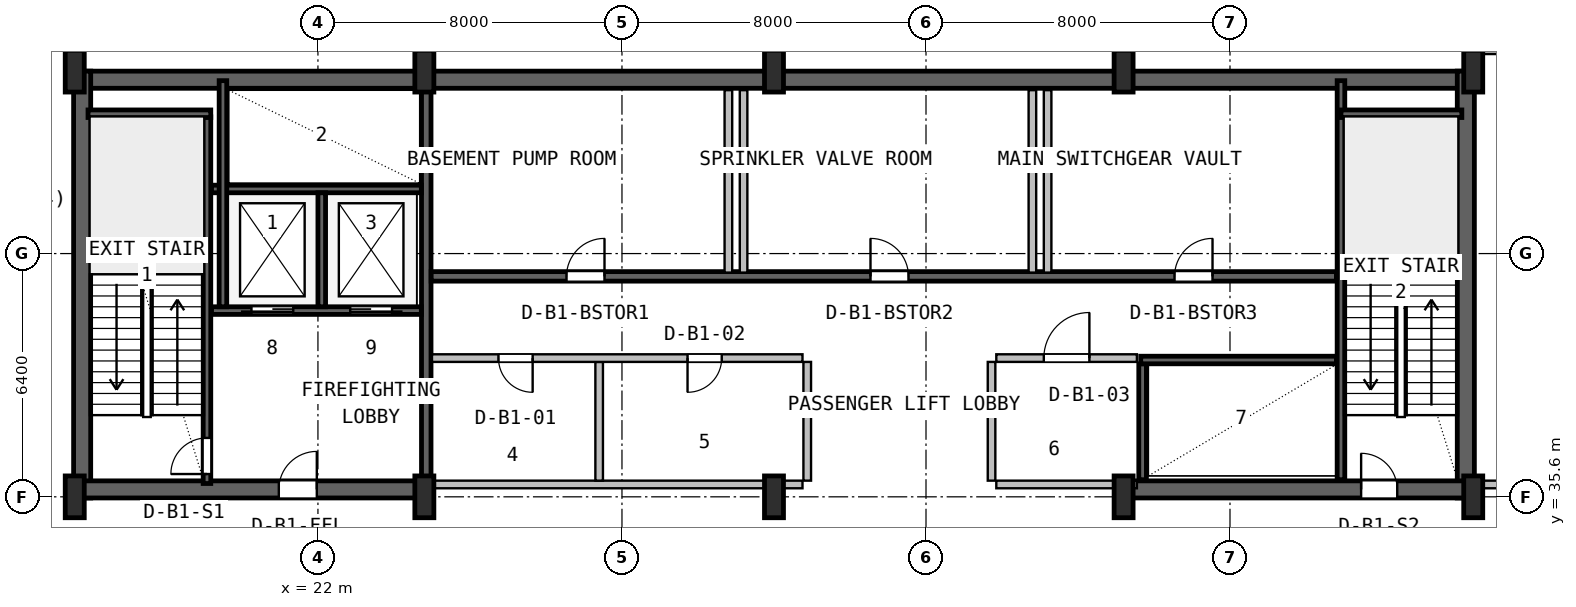
"""IFC4 building model, lengths in metres.
Left out: names, types, materials, properties, quantities, classifications, styles, units other than length and angle.
Written with IfcOpenShell. Run it as: python <this file> out.ifc"""

import sys

from ifc_helpers import new_model, si_unit, direction, frame, frame_2d, origin, origin_2d, place, context, subcontext, project, spatial, rectangle, i_section, extrude, source, transform, mapped, element, fill, save


model = new_model("IFC4")
c1 = context("Model", 3, precision=1e-05, world=origin(), true_north=direction((0.0, 1.0)))
c2 = subcontext(c1, "Body", "Model", "MODEL_VIEW")
j1 = project(units=[si_unit("LENGTHUNIT", "METRE"), si_unit("PLANEANGLEUNIT", "RADIAN")], contexts=[c1])
p1 = place(None, origin())
s1 = spatial("IfcSite", under=j1, at=p1, CompositionType="ELEMENT")
p2 = place(p1, origin())
s2 = spatial("IfcBuilding", under=s1, at=p2, CompositionType="ELEMENT")
p3 = place(p2, frame((0.0, 0.0, -4.8)))
s3 = spatial("IfcBuildingStorey", under=s2, at=p3, CompositionType="ELEMENT", Elevation=-4.8)
p4 = place(p3, frame((15.6, 46.575, 0.0), z_axis=(0.0, 0.0, 1.0), x_axis=(1.0, 0.0, 0.0)))
e1 = element("IfcWall", 1, at=p4, inside=s3, PredefinedType="SHEAR", context=c2, shape_type="SweptSolid", body=[
    extrude(rectangle(XDim=36.8, YDim=0.45, at=frame_2d((18.4, 0.0))), origin(), (0.0, 0.0, 1.0), 4.48),
])
for number, where, z_axis, x_axis in (
    (2, (15.795, 35.57, 0.0), (0.0, 0.0, 1.0), (0.0, 1.0, 0.0)),
    (3, (52.205, 35.57, 0.0), (0.0, 0.0, 1.0), (0.0, 1.0, 0.0)),
):
    element("IfcWall", number, at=place(p3, frame(where, z_axis=z_axis, x_axis=x_axis)), inside=s3, PredefinedType="SHEAR", context=c2, shape_type="SweptSolid", body=[
        extrude(rectangle(XDim=11.23, YDim=0.45, at=frame_2d((5.615, 0.0))), origin(), (0.0, 0.0, 1.0), 4.48),
    ])
p5 = place(p3, frame((15.57, 35.795, 0.0), z_axis=(0.0, 0.0, 1.0), x_axis=(1.0, 0.0, 0.0)))
e4 = element("IfcWall", 4, at=p5, inside=s3, PredefinedType="SHEAR", context=c2, shape_type="SweptSolid", body=[
    extrude(rectangle(XDim=9.23, YDim=0.45, at=frame_2d((4.615, 0.0))), origin(), (0.0, 0.0, 1.0), 4.48),
])
p6 = place(p5, frame((5.4, 0.0, 0.0)))
e5 = element("IfcOpeningElement", 5, at=p6, cuts=e4, PredefinedType="OPENING", context=c2, shape_type="SweptSolid", body=[
    extrude(rectangle(XDim=1.0, YDim=2.1, at=frame_2d((0.5, 1.05))), frame((0.0, 0.235, 0.0), z_axis=(0.0, -1.0, 0.0), x_axis=(1.0, 0.0, 0.0)), (0.0, 0.0, 1.0), 0.47),
])
p7 = place(p3, frame((43.2, 35.795, 0.0), z_axis=(0.0, 0.0, 1.0), x_axis=(1.0, 0.0, 0.0)))
e6 = element("IfcWall", 6, at=p7, inside=s3, PredefinedType="SHEAR", context=c2, shape_type="SweptSolid", body=[
    extrude(rectangle(XDim=9.23, YDim=0.45, at=frame_2d((4.615, 0.0))), origin(), (0.0, 0.0, 1.0), 4.48),
])
p8 = place(p7, frame((6.25, 0.0, 0.0)))
e7 = element("IfcOpeningElement", 7, at=p8, cuts=e6, PredefinedType="OPENING", context=c2, shape_type="SweptSolid", body=[
    extrude(rectangle(XDim=0.95, YDim=2.1, at=frame_2d((0.475, 1.05))), frame((0.0, 0.235, 0.0), z_axis=(0.0, -1.0, 0.0), x_axis=(1.0, 0.0, 0.0)), (0.0, 0.0, 1.0), 0.47),
])
m1 = source(origin(), c2, "Body", "SweptSolid", [
    extrude(i_section(OverallWidth=0.5, OverallDepth=1.1, WebThickness=0.018, FlangeThickness=0.032, FilletRadius=0.018, at=origin_2d()), origin(), (0.0, 0.0, 1.0), 4.8),
])
for number, where, z_axis, x_axis in (
    (8, (15.6, 35.6, 0.0), (0.0, 0.0, 1.0), (1.0, 0.0, 0.0)),
    (9, (15.6, 46.8, 0.0), (0.0, 0.0, 1.0), (1.0, 0.0, 0.0)),
    (10, (24.8, 35.6, 0.0), (0.0, 0.0, 1.0), (1.0, 0.0, 0.0)),
    (11, (24.8, 46.8, 0.0), (0.0, 0.0, 1.0), (1.0, 0.0, 0.0)),
    (12, (34.0, 35.6, 0.0), (0.0, 0.0, 1.0), (1.0, 0.0, 0.0)),
    (13, (34.0, 46.8, 0.0), (0.0, 0.0, 1.0), (1.0, 0.0, 0.0)),
    (14, (43.2, 35.6, 0.0), (0.0, 0.0, 1.0), (1.0, 0.0, 0.0)),
    (15, (43.2, 46.8, 0.0), (0.0, 0.0, 1.0), (1.0, 0.0, 0.0)),
    (16, (52.4, 35.6, 0.0), (0.0, 0.0, 1.0), (1.0, 0.0, 0.0)),
    (17, (52.4, 46.8, 0.0), (0.0, 0.0, 1.0), (1.0, 0.0, 0.0)),
):
    element("IfcColumn", number, at=place(p3, frame(where, z_axis=z_axis, x_axis=x_axis)), inside=s3, PredefinedType="COLUMN", context=c2, shape_type="MappedRepresentation", body=[
        mapped(m1, transform((0.0, 0.0, 0.0), x_axis=(1.0, 0.0, 0.0), y_axis=(0.0, 1.0, 0.0), z_axis=(0.0, 0.0, 1.0), scale=1.0)),
    ])
p9 = place(p3, frame((19.08, 35.95, 0.0), z_axis=(0.0, 0.0, 1.0), x_axis=(0.0, 1.0, 0.0)))
e18 = element("IfcWall", 18, at=p9, inside=s3, PredefinedType="SHEAR", context=c2, shape_type="SweptSolid", body=[
    extrude(rectangle(XDim=9.65, YDim=0.2, at=frame_2d((4.825, 0.0))), origin(), (0.0, 0.0, 1.0), 4.48),
])
p10 = place(p9, frame((0.25, 0.0, 0.0)))
e19 = element("IfcOpeningElement", 19, at=p10, cuts=e18, PredefinedType="OPENING", context=c2, shape_type="SweptSolid", body=[
    extrude(rectangle(XDim=0.95, YDim=2.1, at=frame_2d((0.475, 1.05))), frame((0.0, 0.11, 0.0), z_axis=(0.0, -1.0, 0.0), x_axis=(1.0, 0.0, 0.0)), (0.0, 0.0, 1.0), 0.22),
])
p11 = place(p3, frame((15.95, 45.68, 0.0), z_axis=(0.0, 0.0, 1.0), x_axis=(1.0, 0.0, 0.0)))
e20 = element("IfcWall", 20, at=p11, inside=s3, PredefinedType="SHEAR", context=c2, shape_type="SweptSolid", body=[
    extrude(rectangle(XDim=3.23, YDim=0.2, at=frame_2d((1.615, 0.0))), origin(), (0.0, 0.0, 1.0), 4.48),
])
p12 = place(p3, frame((24.85, 36.05, 0.0), z_axis=(0.0, 0.0, 1.0), x_axis=(0.0, 1.0, 0.0)))
e21 = element("IfcWall", 21, at=p12, inside=s3, PredefinedType="SHEAR", context=c2, shape_type="SweptSolid", body=[
    extrude(rectangle(XDim=10.45, YDim=0.25, at=frame_2d((5.225, 0.0))), origin(), (0.0, 0.0, 1.0), 4.48),
])
p13 = place(p3, frame((19.2, 40.5, 0.0), z_axis=(0.0, 0.0, 1.0), x_axis=(1.0, 0.0, 0.0)))
e22 = element("IfcWall", 22, at=p13, inside=s3, PredefinedType="SHEAR", context=c2, shape_type="SweptSolid", body=[
    extrude(rectangle(XDim=5.52, YDim=0.2, at=frame_2d((2.76, 0.0))), origin(), (0.0, 0.0, 1.0), 4.48),
])
p14 = place(p13, frame((1.05, 0.0, 0.0)))
e23 = element("IfcOpeningElement", 23, at=p14, cuts=e22, PredefinedType="OPENING", context=c2, shape_type="SweptSolid", body=[
    extrude(rectangle(XDim=1.1, YDim=2.18, at=frame_2d((0.55, 1.09))), frame((0.0, 0.11, 0.0), z_axis=(0.0, -1.0, 0.0), x_axis=(1.0, 0.0, 0.0)), (0.0, 0.0, 1.0), 0.22),
])
p15 = place(p13, frame((3.65, 0.0, 0.0)))
e24 = element("IfcOpeningElement", 24, at=p15, cuts=e22, PredefinedType="OPENING", context=c2, shape_type="SweptSolid", body=[
    extrude(rectangle(XDim=1.1, YDim=2.18, at=frame_2d((0.55, 1.09))), frame((0.0, 0.11, 0.0), z_axis=(0.0, -1.0, 0.0), x_axis=(1.0, 0.0, 0.0)), (0.0, 0.0, 1.0), 0.22),
])
p16 = place(p3, frame((19.2, 43.7, 0.0), z_axis=(0.0, 0.0, 1.0), x_axis=(1.0, 0.0, 0.0)))
e25 = element("IfcWall", 25, at=p16, inside=s3, PredefinedType="SHEAR", context=c2, shape_type="SweptSolid", body=[
    extrude(rectangle(XDim=5.52, YDim=0.2, at=frame_2d((2.76, 0.0))), origin(), (0.0, 0.0, 1.0), 4.48),
])
p17 = place(p3, frame((22.1, 40.6, 0.0), z_axis=(0.0, 0.0, 1.0), x_axis=(0.0, 1.0, 0.0)))
e26 = element("IfcWall", 26, at=p17, inside=s3, PredefinedType="SHEAR", context=c2, shape_type="SweptSolid", body=[
    extrude(rectangle(XDim=3.0, YDim=0.2, at=frame_2d((1.5, 0.0))), origin(), (0.0, 0.0, 1.0), 4.48),
])
p18 = place(p3, frame((19.5, 40.6, 0.0), z_axis=(0.0, 0.0, 1.0), x_axis=(0.0, 1.0, 0.0)))
e27 = element("IfcWall", 27, at=p18, inside=s3, PredefinedType="SHEAR", context=c2, shape_type="SweptSolid", body=[
    extrude(rectangle(XDim=5.95, YDim=0.2, at=frame_2d((2.975, 0.0))), origin(), (0.0, 0.0, 1.0), 4.48),
])
p19 = place(p3, frame((48.92, 36.05, 0.0), z_axis=(0.0, 0.0, 1.0), x_axis=(0.0, 1.0, 0.0)))
e28 = element("IfcWall", 28, at=p19, inside=s3, PredefinedType="SHEAR", context=c2, shape_type="SweptSolid", body=[
    extrude(rectangle(XDim=10.5, YDim=0.2, at=frame_2d((5.25, 0.0))), origin(), (0.0, 0.0, 1.0), 4.48),
])
p20 = place(p3, frame((48.92, 45.68, 0.0), z_axis=(0.0, 0.0, 1.0), x_axis=(1.0, 0.0, 0.0)))
e29 = element("IfcWall", 29, at=p20, inside=s3, PredefinedType="SHEAR", context=c2, shape_type="SweptSolid", body=[
    extrude(rectangle(XDim=3.18, YDim=0.2, at=frame_2d((1.59, 0.0))), origin(), (0.0, 0.0, 1.0), 4.48),
])
p21 = place(p3, frame((24.98, 41.4, 0.0), z_axis=(0.0, 0.0, 1.0), x_axis=(1.0, 0.0, 0.0)))
e30 = element("IfcWall", 30, at=p21, inside=s3, PredefinedType="SHEAR", context=c2, shape_type="SweptSolid", body=[
    extrude(rectangle(XDim=23.82, YDim=0.25, at=frame_2d((11.91, 0.0))), origin(), (0.0, 0.0, 1.0), 4.48),
])
p22 = place(p21, frame((3.56, 0.0, 0.0)))
e31 = element("IfcOpeningElement", 31, at=p22, cuts=e30, PredefinedType="OPENING", context=c2, shape_type="SweptSolid", body=[
    extrude(rectangle(XDim=1.0, YDim=2.08, at=frame_2d((0.5, 1.04))), frame((0.0, 0.135, 0.0), z_axis=(0.0, -1.0, 0.0), x_axis=(1.0, 0.0, 0.0)), (0.0, 0.0, 1.0), 0.27),
])
p23 = place(p21, frame((11.56, 0.0, 0.0)))
e32 = element("IfcOpeningElement", 32, at=p23, cuts=e30, PredefinedType="OPENING", context=c2, shape_type="SweptSolid", body=[
    extrude(rectangle(XDim=1.0, YDim=2.08, at=frame_2d((0.5, 1.04))), frame((0.0, 0.135, 0.0), z_axis=(0.0, -1.0, 0.0), x_axis=(1.0, 0.0, 0.0)), (0.0, 0.0, 1.0), 0.27),
])
p24 = place(p21, frame((19.56, 0.0, 0.0)))
e33 = element("IfcOpeningElement", 33, at=p24, cuts=e30, PredefinedType="OPENING", context=c2, shape_type="SweptSolid", body=[
    extrude(rectangle(XDim=1.0, YDim=2.08, at=frame_2d((0.5, 1.04))), frame((0.0, 0.135, 0.0), z_axis=(0.0, -1.0, 0.0), x_axis=(1.0, 0.0, 0.0)), (0.0, 0.0, 1.0), 0.27),
])
p25 = place(p3, frame((43.7, 36.05, 0.0), z_axis=(0.0, 0.0, 1.0), x_axis=(0.0, 1.0, 0.0)))
e34 = element("IfcWall", 34, at=p25, inside=s3, PredefinedType="SHEAR", context=c2, shape_type="SweptSolid", body=[
    extrude(rectangle(XDim=3.05, YDim=0.2, at=frame_2d((1.525, 0.0))), origin(), (0.0, 0.0, 1.0), 4.48),
])
p26 = place(p3, frame((43.65, 39.2, 0.0), z_axis=(0.0, 0.0, 1.0), x_axis=(1.0, 0.0, 0.0)))
e35 = element("IfcWall", 35, at=p26, inside=s3, PredefinedType="SHEAR", context=c2, shape_type="SweptSolid", body=[
    extrude(rectangle(XDim=5.15, YDim=0.2, at=frame_2d((2.575, 0.0))), origin(), (0.0, 0.0, 1.0), 4.48),
])
p27 = place(p3, frame((25.0, 35.925, 0.0), z_axis=(0.0, 0.0, 1.0), x_axis=(1.0, 0.0, 0.0)))
e36 = element("IfcWall", 36, at=p27, inside=s3, PredefinedType="PLUMBINGWALL", context=c2, shape_type="SweptSolid", body=[
    extrude(rectangle(XDim=9.75, YDim=0.2, at=frame_2d((4.875, 0.0))), origin(), (0.0, 0.0, 1.0), 4.46),
])
p28 = place(p3, frame((29.4, 36.025, 0.0), z_axis=(0.0, 0.0, 1.0), x_axis=(0.0, 1.0, 0.0)))
e37 = element("IfcWall", 37, at=p28, inside=s3, PredefinedType="PLUMBINGWALL", context=c2, shape_type="SweptSolid", body=[
    extrude(rectangle(XDim=3.125, YDim=0.2, at=frame_2d((1.562, 0.0))), origin(), (0.0, 0.0, 1.0), 4.46),
])
p29 = place(p3, frame((25.0, 39.25, 0.0), z_axis=(0.0, 0.0, 1.0), x_axis=(1.0, 0.0, 0.0)))
e38 = element("IfcWall", 38, at=p29, inside=s3, PredefinedType="PLUMBINGWALL", context=c2, shape_type="SweptSolid", body=[
    extrude(rectangle(XDim=9.75, YDim=0.2, at=frame_2d((4.875, 0.0))), origin(), (0.0, 0.0, 1.0), 4.46),
])
p30 = place(p29, frame((1.75, 0.0, 0.0)))
e39 = element("IfcOpeningElement", 39, at=p30, cuts=e38, PredefinedType="OPENING", context=c2, shape_type="SweptSolid", body=[
    extrude(rectangle(XDim=0.9, YDim=2.06, at=frame_2d((0.45, 1.03))), frame((0.0, 0.11, 0.0), z_axis=(0.0, -1.0, 0.0), x_axis=(1.0, 0.0, 0.0)), (0.0, 0.0, 1.0), 0.22),
])
p31 = place(p29, frame((6.725, 0.0, 0.0)))
e40 = element("IfcOpeningElement", 40, at=p31, cuts=e38, PredefinedType="OPENING", context=c2, shape_type="SweptSolid", body=[
    extrude(rectangle(XDim=0.9, YDim=2.06, at=frame_2d((0.45, 1.03))), frame((0.0, 0.11, 0.0), z_axis=(0.0, -1.0, 0.0), x_axis=(1.0, 0.0, 0.0)), (0.0, 0.0, 1.0), 0.22),
])
p32 = place(p3, frame((34.875, 36.025, 0.0), z_axis=(0.0, 0.0, 1.0), x_axis=(0.0, 1.0, 0.0)))
e41 = element("IfcWall", 41, at=p32, inside=s3, PredefinedType="PLUMBINGWALL", context=c2, shape_type="SweptSolid", body=[
    extrude(rectangle(XDim=3.125, YDim=0.2, at=frame_2d((1.562, 0.0))), origin(), (0.0, 0.0, 1.0), 4.46),
])
p33 = place(p3, frame((39.85, 35.925, 0.0), z_axis=(0.0, 0.0, 1.0), x_axis=(1.0, 0.0, 0.0)))
e42 = element("IfcWall", 42, at=p33, inside=s3, PredefinedType="SOLIDWALL", context=c2, shape_type="SweptSolid", body=[
    extrude(rectangle(XDim=3.7, YDim=0.2, at=frame_2d((1.85, 0.0))), origin(), (0.0, 0.0, 1.0), 4.46),
])
p34 = place(p3, frame((39.85, 39.25, 0.0), z_axis=(0.0, 0.0, 1.0), x_axis=(1.0, 0.0, 0.0)))
e43 = element("IfcWall", 43, at=p34, inside=s3, PredefinedType="SOLIDWALL", context=c2, shape_type="SweptSolid", body=[
    extrude(rectangle(XDim=3.7, YDim=0.2, at=frame_2d((1.85, 0.0))), origin(), (0.0, 0.0, 1.0), 4.46),
])
p35 = place(p34, frame((1.25, 0.0, 0.0)))
e44 = element("IfcOpeningElement", 44, at=p35, cuts=e43, PredefinedType="OPENING", context=c2, shape_type="SweptSolid", body=[
    extrude(rectangle(XDim=1.2, YDim=2.1, at=frame_2d((0.6, 1.05))), frame((0.0, 0.11, 0.0), z_axis=(0.0, -1.0, 0.0), x_axis=(1.0, 0.0, 0.0)), (0.0, 0.0, 1.0), 0.22),
])
p36 = place(p3, frame((39.725, 36.025, 0.0), z_axis=(0.0, 0.0, 1.0), x_axis=(0.0, 1.0, 0.0)))
e45 = element("IfcWall", 45, at=p36, inside=s3, PredefinedType="SOLIDWALL", context=c2, shape_type="SweptSolid", body=[
    extrude(rectangle(XDim=3.125, YDim=0.2, at=frame_2d((1.562, 0.0))), origin(), (0.0, 0.0, 1.0), 4.46),
])
p37 = place(p3, frame((52.65, 35.925, 0.0), z_axis=(0.0, 0.0, 1.0), x_axis=(1.0, 0.0, 0.0)))
e46 = element("IfcWall", 46, at=p37, inside=s3, PredefinedType="SOLIDWALL", context=c2, shape_type="SweptSolid", body=[
    extrude(rectangle(XDim=14.7, YDim=0.2, at=frame_2d((7.35, 0.0))), origin(), (0.0, 0.0, 1.0), 3.275),
])
p38 = place(p37, frame((1.575, 0.0, 0.0)))
e47 = element("IfcOpeningElement", 47, at=p38, cuts=e46, PredefinedType="OPENING", context=c2, shape_type="SweptSolid", body=[
    extrude(rectangle(XDim=1.2, YDim=2.1, at=frame_2d((0.6, 1.05))), frame((0.0, 0.11, 0.0), z_axis=(0.0, -1.0, 0.0), x_axis=(1.0, 0.0, 0.0)), (0.0, 0.0, 1.0), 0.22),
])
p39 = place(p3, frame((52.65, 47.35, 0.0), z_axis=(0.0, 0.0, 1.0), x_axis=(1.0, 0.0, 0.0)))
e48 = element("IfcWall", 48, at=p39, inside=s3, PredefinedType="SOLIDWALL", context=c2, shape_type="SweptSolid", body=[
    extrude(rectangle(XDim=14.7, YDim=0.2, at=frame_2d((7.35, 0.0))), origin(), (0.0, 0.0, 1.0), 4.46),
])
for number, where, z_axis, x_axis in (
    (49, (32.8, 41.5, 0.0), (0.0, 0.0, 1.0), (0.0, 1.0, 0.0)),
    (50, (40.8, 41.5, 0.0), (0.0, 0.0, 1.0), (0.0, 1.0, 0.0)),
    (51, (33.2, 41.5, 0.0), (0.0, 0.0, 1.0), (0.0, 1.0, 0.0)),
    (52, (41.2, 41.5, 0.0), (0.0, 0.0, 1.0), (0.0, 1.0, 0.0)),
):
    element("IfcWall", number, at=place(p3, frame(where, z_axis=z_axis, x_axis=x_axis)), inside=s3, PredefinedType="SOLIDWALL", context=c2, shape_type="SweptSolid", body=[
        extrude(rectangle(XDim=4.8, YDim=0.2, at=frame_2d((2.4, 0.0))), origin(), (0.0, 0.0, 1.0), 4.46),
    ])
m2 = source(origin(), c2, "Body", "SweptSolid", [
    extrude(rectangle(XDim=0.95, YDim=2.1, at=frame_2d((0.475, 1.05))), frame((0.0, 0.025, 0.0), z_axis=(0.0, -1.0, 0.0), x_axis=(1.0, 0.0, 0.0)), (0.0, 0.0, 1.0), 0.05),
])
p40 = place(p10, origin())
e53 = element("IfcDoor", 53, at=p40, inside=s3, OperationType="SINGLE_SWING_LEFT", PredefinedType="DOOR", context=c2, shape_type="MappedRepresentation", body=[
    mapped(m2, transform((0.0, 0.0, 0.0), x_axis=(1.0, 0.0, 0.0), y_axis=(0.0, 1.0, 0.0), z_axis=(0.0, 0.0, 1.0), scale=1.0)),
])
fill(e19, e53)
m3 = source(origin(), c2, "Body", "SweptSolid", [
    extrude(rectangle(XDim=1.0, YDim=2.1, at=frame_2d((0.5, 1.05))), frame((0.0, 0.025, 0.0), z_axis=(0.0, -1.0, 0.0), x_axis=(1.0, 0.0, 0.0)), (0.0, 0.0, 1.0), 0.05),
])
p41 = place(p6, origin())
e54 = element("IfcDoor", 54, at=p41, inside=s3, OperationType="SINGLE_SWING_RIGHT", PredefinedType="DOOR", context=c2, shape_type="MappedRepresentation", body=[
    mapped(m3, transform((0.0, 0.0, 0.0), x_axis=(1.0, 0.0, 0.0), y_axis=(0.0, 1.0, 0.0), z_axis=(0.0, 0.0, 1.0), scale=1.0)),
])
fill(e5, e54)
m4 = source(origin(), c2, "Body", "SweptSolid", [
    extrude(rectangle(XDim=1.1, YDim=2.18, at=frame_2d((0.55, 1.09))), frame((0.0, 0.025, 0.0), z_axis=(0.0, -1.0, 0.0), x_axis=(1.0, 0.0, 0.0)), (0.0, 0.0, 1.0), 0.05),
])
p42 = place(p14, frame((1.1, 0.0, 0.0), z_axis=(0.0, 0.0, 1.0), x_axis=(-1.0, 0.0, 0.0)))
e55 = element("IfcDoor", 55, at=p42, inside=s3, OperationType="SLIDING_TO_LEFT", PredefinedType="DOOR", context=c2, shape_type="MappedRepresentation", body=[
    mapped(m4, transform((0.0, 0.0, 0.0), x_axis=(1.0, 0.0, 0.0), y_axis=(0.0, 1.0, 0.0), z_axis=(0.0, 0.0, 1.0), scale=1.0)),
])
fill(e23, e55)
p43 = place(p15, frame((1.1, 0.0, 0.0), z_axis=(0.0, 0.0, 1.0), x_axis=(-1.0, 0.0, 0.0)))
e56 = element("IfcDoor", 56, at=p43, inside=s3, OperationType="SLIDING_TO_RIGHT", PredefinedType="DOOR", context=c2, shape_type="MappedRepresentation", body=[
    mapped(m4, transform((0.0, 0.0, 0.0), x_axis=(1.0, 0.0, 0.0), y_axis=(0.0, 1.0, 0.0), z_axis=(0.0, 0.0, 1.0), scale=1.0)),
])
fill(e24, e56)
p44 = place(p8, origin())
e57 = element("IfcDoor", 57, at=p44, inside=s3, OperationType="SINGLE_SWING_LEFT", PredefinedType="DOOR", context=c2, shape_type="MappedRepresentation", body=[
    mapped(m2, transform((0.0, 0.0, 0.0), x_axis=(1.0, 0.0, 0.0), y_axis=(0.0, 1.0, 0.0), z_axis=(0.0, 0.0, 1.0), scale=1.0)),
])
fill(e7, e57)
m5 = source(origin(), c2, "Body", "SweptSolid", [
    extrude(rectangle(XDim=1.0, YDim=2.08, at=frame_2d((0.5, 1.04))), frame((0.0, 0.025, 0.0), z_axis=(0.0, -1.0, 0.0), x_axis=(1.0, 0.0, 0.0)), (0.0, 0.0, 1.0), 0.05),
])
p45 = place(p22, origin())
e58 = element("IfcDoor", 58, at=p45, inside=s3, OperationType="SINGLE_SWING_RIGHT", PredefinedType="DOOR", context=c2, shape_type="MappedRepresentation", body=[
    mapped(m5, transform((0.0, 0.0, 0.0), x_axis=(1.0, 0.0, 0.0), y_axis=(0.0, 1.0, 0.0), z_axis=(0.0, 0.0, 1.0), scale=1.0)),
])
fill(e31, e58)
p46 = place(p23, origin())
e59 = element("IfcDoor", 59, at=p46, inside=s3, OperationType="SINGLE_SWING_LEFT", PredefinedType="DOOR", context=c2, shape_type="MappedRepresentation", body=[
    mapped(m5, transform((0.0, 0.0, 0.0), x_axis=(1.0, 0.0, 0.0), y_axis=(0.0, 1.0, 0.0), z_axis=(0.0, 0.0, 1.0), scale=1.0)),
])
fill(e32, e59)
p47 = place(p24, origin())
e60 = element("IfcDoor", 60, at=p47, inside=s3, OperationType="SINGLE_SWING_RIGHT", PredefinedType="DOOR", context=c2, shape_type="MappedRepresentation", body=[
    mapped(m5, transform((0.0, 0.0, 0.0), x_axis=(1.0, 0.0, 0.0), y_axis=(0.0, 1.0, 0.0), z_axis=(0.0, 0.0, 1.0), scale=1.0)),
])
fill(e33, e60)
m6 = source(origin(), c2, "Body", "SweptSolid", [
    extrude(rectangle(XDim=0.9, YDim=2.06, at=frame_2d((0.45, 1.03))), frame((0.0, 0.025, 0.0), z_axis=(0.0, -1.0, 0.0), x_axis=(1.0, 0.0, 0.0)), (0.0, 0.0, 1.0), 0.05),
])
p48 = place(p30, frame((0.9, 0.0, 0.0), z_axis=(0.0, 0.0, 1.0), x_axis=(-1.0, 0.0, 0.0)))
e61 = element("IfcDoor", 61, at=p48, inside=s3, OperationType="SINGLE_SWING_RIGHT", PredefinedType="DOOR", context=c2, shape_type="MappedRepresentation", body=[
    mapped(m6, transform((0.0, 0.0, 0.0), x_axis=(1.0, 0.0, 0.0), y_axis=(0.0, 1.0, 0.0), z_axis=(0.0, 0.0, 1.0), scale=1.0)),
])
fill(e39, e61)
p49 = place(p31, frame((0.9, 0.0, 0.0), z_axis=(0.0, 0.0, 1.0), x_axis=(-1.0, 0.0, 0.0)))
e62 = element("IfcDoor", 62, at=p49, inside=s3, OperationType="SINGLE_SWING_LEFT", PredefinedType="DOOR", context=c2, shape_type="MappedRepresentation", body=[
    mapped(m6, transform((0.0, 0.0, 0.0), x_axis=(1.0, 0.0, 0.0), y_axis=(0.0, 1.0, 0.0), z_axis=(0.0, 0.0, 1.0), scale=1.0)),
])
fill(e40, e62)
m7 = source(origin(), c2, "Body", "SweptSolid", [
    extrude(rectangle(XDim=1.2, YDim=2.1, at=frame_2d((0.6, 1.05))), frame((0.0, 0.025, 0.0), z_axis=(0.0, -1.0, 0.0), x_axis=(1.0, 0.0, 0.0)), (0.0, 0.0, 1.0), 0.05),
])
p50 = place(p35, origin())
e63 = element("IfcDoor", 63, at=p50, inside=s3, OperationType="SINGLE_SWING_RIGHT", PredefinedType="DOOR", context=c2, shape_type="MappedRepresentation", body=[
    mapped(m7, transform((0.0, 0.0, 0.0), x_axis=(1.0, 0.0, 0.0), y_axis=(0.0, 1.0, 0.0), z_axis=(0.0, 0.0, 1.0), scale=1.0)),
])
fill(e44, e63)
save(model, sys.argv[1])
